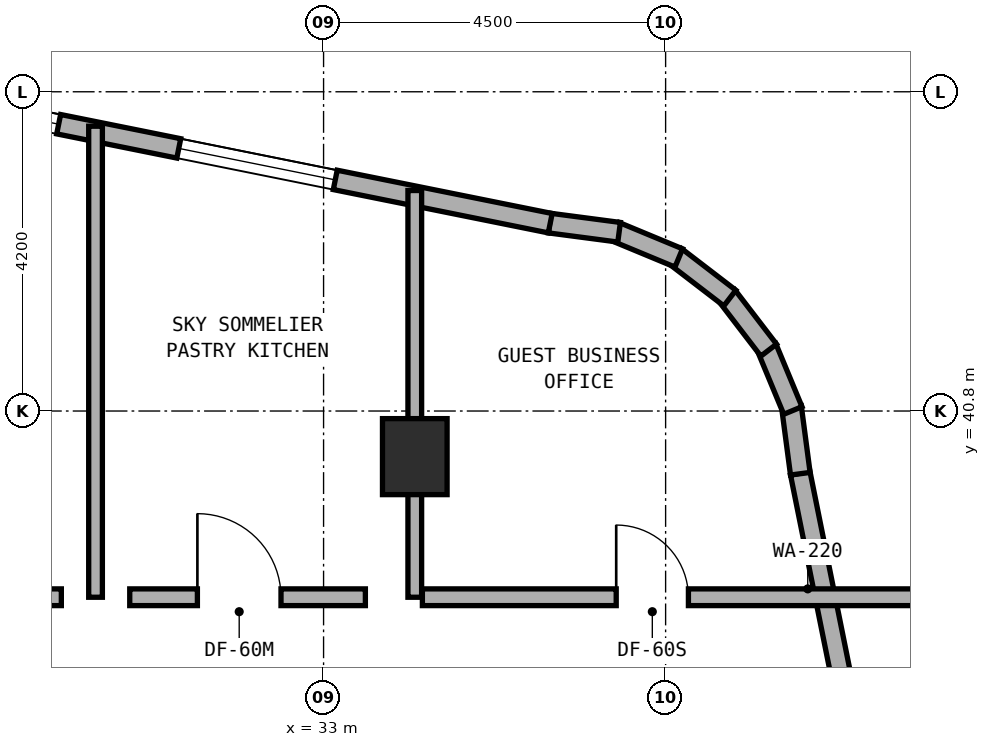
"""IFC4 building model, lengths in metres.
Left out: names, types, materials, properties, quantities, classifications, styles, units other than length and angle.
Written with IfcOpenShell. Run it as: python <this file> out.ifc"""

import sys

from ifc_helpers import new_model, si_unit, direction, frame, frame_2d, origin, origin_2d, place, context, subcontext, project, spatial, rectangle, extrude, element, fill, save


model = new_model("IFC4")
c1 = context("Model", 3, precision=1e-05, world=origin(), true_north=direction((0.0, 1.0)))
c2 = subcontext(c1, "Body", "Model", "MODEL_VIEW")
j1 = project(units=[si_unit("LENGTHUNIT", "METRE"), si_unit("PLANEANGLEUNIT", "RADIAN")], contexts=[c1])
p1 = place(None, origin())
s1 = spatial("IfcSite", under=j1, at=p1, CompositionType="ELEMENT")
p2 = place(p1, origin())
s2 = spatial("IfcBuilding", under=s1, at=p2, CompositionType="ELEMENT")
p3 = place(p2, frame((0.0, 0.0, 166.0)))
s3 = spatial("IfcBuildingStorey", under=s2, at=p3, CompositionType="ELEMENT", Elevation=166.0)
p4 = place(p3, frame((34.2, 40.2, 0.0), z_axis=(0.0, 0.0, 1.0), x_axis=(1.0, 0.0, 0.0)))
e1 = element("IfcColumn", 1, at=p4, inside=s3, PredefinedType="COLUMN", context=c2, shape_type="SweptSolid", body=[
    extrude(rectangle(XDim=0.85, YDim=1.0, at=origin_2d()), origin(), (0.0, 0.0, 1.0), 3.5),
])
p5 = place(p3, frame((41.084, 30.98, 0.0), z_axis=(0.0, 0.0, 1.0), x_axis=(-0.197435082048, 0.980315963543, 0.0)))
e2 = element("IfcWall", 2, at=p5, inside=s3, PredefinedType="STANDARD", context=c2, shape_type="SweptSolid", body=[
    extrude(rectangle(XDim=9.183, YDim=0.26, at=frame_2d((4.591, 0.0))), origin(), (0.0, 0.0, 1.0), 3.22),
])
p6 = place(p5, frame((1.734, 0.0, 0.85)))
e3 = element("IfcOpeningElement", 3, at=p6, cuts=e2, PredefinedType="OPENING", context=c2, shape_type="SweptSolid", body=[
    extrude(rectangle(XDim=2.1, YDim=1.5, at=frame_2d((1.05, 0.75))), frame((0.0, 0.14, 0.0), z_axis=(0.0, -1.0, 0.0), x_axis=(1.0, 0.0, 0.0)), (0.0, 0.0, 1.0), 0.28),
])
p7 = place(p3, frame((39.272, 39.975, 0.0), z_axis=(0.0, 0.0, 1.0), x_axis=(-0.130953706898, 0.991388484223, 0.0)))
e4 = element("IfcWall", 4, at=p7, inside=s3, PredefinedType="STANDARD", context=c2, shape_type="SweptSolid", body=[
    extrude(rectangle(XDim=0.885, YDim=0.26, at=frame_2d((0.443, 0.0))), origin(), (0.0, 0.0, 1.0), 3.22),
])
p8 = place(p3, frame((39.174, 40.807, 0.0), z_axis=(0.0, 0.0, 1.0), x_axis=(-0.383290660547, 0.923627776508, 0.0)))
e5 = element("IfcWall", 5, at=p8, inside=s3, PredefinedType="STANDARD", context=c2, shape_type="SweptSolid", body=[
    extrude(rectangle(XDim=0.903, YDim=0.26, at=frame_2d((0.452, 0.0))), origin(), (0.0, 0.0, 1.0), 3.22),
])
p9 = place(p3, frame((38.856, 41.601, 0.0), z_axis=(0.0, 0.0, 1.0), x_axis=(-0.608624690463, 0.793458244748, 0.0)))
e6 = element("IfcWall", 6, at=p9, inside=s3, PredefinedType="STANDARD", context=c2, shape_type="SweptSolid", body=[
    extrude(rectangle(XDim=0.902, YDim=0.26, at=frame_2d((0.451, 0.0))), origin(), (0.0, 0.0, 1.0), 3.22),
])
p10 = place(p3, frame((38.345, 42.286, 0.0), z_axis=(0.0, 0.0, 1.0), x_axis=(-0.793558456666, 0.608494022858, 0.0)))
e7 = element("IfcWall", 7, at=p10, inside=s3, PredefinedType="STANDARD", context=c2, shape_type="SweptSolid", body=[
    extrude(rectangle(XDim=0.902, YDim=0.26, at=frame_2d((0.451, 0.0))), origin(), (0.0, 0.0, 1.0), 3.22),
])
p11 = place(p3, frame((37.673, 42.814, 0.0), z_axis=(0.0, 0.0, 1.0), x_axis=(-0.923683767999, 0.383155708213, 0.0)))
e8 = element("IfcWall", 8, at=p11, inside=s3, PredefinedType="STANDARD", context=c2, shape_type="SweptSolid", body=[
    extrude(rectangle(XDim=0.903, YDim=0.26, at=frame_2d((0.451, 0.0))), origin(), (0.0, 0.0, 1.0), 3.22),
])
p12 = place(p3, frame((36.888, 43.152, 0.0), z_axis=(0.0, 0.0, 1.0), x_axis=(-0.991487658083, 0.130200706103, 0.0)))
e9 = element("IfcWall", 9, at=p12, inside=s3, PredefinedType="STANDARD", context=c2, shape_type="SweptSolid", body=[
    extrude(rectangle(XDim=0.921, YDim=0.26, at=frame_2d((0.46, 0.0))), origin(), (0.0, 0.0, 1.0), 3.22),
])
p13 = place(p3, frame((35.982, 43.271, 0.0), z_axis=(0.0, 0.0, 1.0), x_axis=(-0.980317172899, 0.197429077186, 0.0)))
e10 = element("IfcWall", 10, at=p13, inside=s3, PredefinedType="STANDARD", context=c2, shape_type="SweptSolid", body=[
    extrude(rectangle(XDim=9.117, YDim=0.26, at=frame_2d((4.559, 0.0))), origin(), (0.0, 0.0, 1.0), 3.22),
])
p14 = place(p13, frame((2.885, 0.0, 0.85)))
e11 = element("IfcOpeningElement", 11, at=p14, cuts=e10, PredefinedType="OPENING", context=c2, shape_type="SweptSolid", body=[
    extrude(rectangle(XDim=2.1, YDim=1.5, at=frame_2d((1.05, 0.75))), frame((0.0, 0.14, 0.0), z_axis=(0.0, -1.0, 0.0), x_axis=(1.0, 0.0, 0.0)), (0.0, 0.0, 1.0), 0.28),
])
p15 = place(p13, frame((6.597, 0.0, 0.85)))
e12 = element("IfcOpeningElement", 12, at=p15, cuts=e10, PredefinedType="OPENING", context=c2, shape_type="SweptSolid", body=[
    extrude(rectangle(XDim=2.1, YDim=1.5, at=frame_2d((1.05, 0.75))), frame((0.0, 0.14, 0.0), z_axis=(0.0, -1.0, 0.0), x_axis=(1.0, 0.0, 0.0)), (0.0, 0.0, 1.0), 0.28),
])
p16 = place(p3, frame((30.0, 38.35, 0.0), z_axis=(0.0, 0.0, 1.0), x_axis=(0.0, 1.0, 0.0)))
e13 = element("IfcWall", 13, at=p16, inside=s3, PredefinedType="SOLIDWALL", context=c2, shape_type="SweptSolid", body=[
    extrude(rectangle(XDim=6.197, YDim=0.18, at=frame_2d((3.099, 0.0))), origin(), (0.0, 0.0, 1.0), 2.835),
])
p17 = place(p3, frame((26.45, 38.35, 0.0), z_axis=(0.0, 0.0, 1.0), x_axis=(1.0, 0.0, 0.0)))
e14 = element("IfcWall", 14, at=p17, inside=s3, PredefinedType="SOLIDWALL", context=c2, shape_type="SweptSolid", body=[
    extrude(rectangle(XDim=3.1, YDim=0.22, at=frame_2d((1.55, 0.0))), origin(), (0.0, 0.0, 1.0), 2.795),
])
p18 = place(p17, frame((0.89, 0.0, 0.0)))
e15 = element("IfcOpeningElement", 15, at=p18, cuts=e14, PredefinedType="OPENING", context=c2, shape_type="SweptSolid", body=[
    extrude(rectangle(XDim=1.1, YDim=2.1, at=frame_2d((0.55, 1.05))), frame((0.0, 0.12, 0.0), z_axis=(0.0, -1.0, 0.0), x_axis=(1.0, 0.0, 0.0)), (0.0, 0.0, 1.0), 0.24),
])
p19 = place(p3, frame((30.45, 38.35, 0.0), z_axis=(0.0, 0.0, 1.0), x_axis=(1.0, 0.0, 0.0)))
e16 = element("IfcWall", 16, at=p19, inside=s3, PredefinedType="SOLIDWALL", context=c2, shape_type="SweptSolid", body=[
    extrude(rectangle(XDim=3.1, YDim=0.22, at=frame_2d((1.55, 0.0))), origin(), (0.0, 0.0, 1.0), 3.22),
])
p20 = place(p19, frame((0.89, 0.0, 0.0)))
e17 = element("IfcOpeningElement", 17, at=p20, cuts=e16, PredefinedType="OPENING", context=c2, shape_type="SweptSolid", body=[
    extrude(rectangle(XDim=1.1, YDim=2.1, at=frame_2d((0.55, 1.05))), frame((0.0, 0.12, 0.0), z_axis=(0.0, -1.0, 0.0), x_axis=(1.0, 0.0, 0.0)), (0.0, 0.0, 1.0), 0.24),
])
p21 = place(p3, frame((34.2, 38.35, 0.0), z_axis=(0.0, 0.0, 1.0), x_axis=(0.0, 1.0, 0.0)))
e18 = element("IfcWall", 18, at=p21, inside=s3, PredefinedType="SOLIDWALL", context=c2, shape_type="SweptSolid", body=[
    extrude(rectangle(XDim=5.351, YDim=0.18, at=frame_2d((2.675, 0.0))), origin(), (0.0, 0.0, 1.0), 2.795),
])
p22 = place(p3, frame((34.3, 38.35, 0.0), z_axis=(0.0, 0.0, 1.0), x_axis=(1.0, 0.0, 0.0)))
e19 = element("IfcWall", 19, at=p22, inside=s3, PredefinedType="SOLIDWALL", context=c2, shape_type="SweptSolid", body=[
    extrude(rectangle(XDim=6.64, YDim=0.22, at=frame_2d((3.32, 0.0))), origin(), (0.0, 0.0, 1.0), 2.835),
])
p23 = place(p22, frame((2.55, 0.0, 0.0)))
e20 = element("IfcOpeningElement", 20, at=p23, cuts=e19, PredefinedType="OPENING", context=c2, shape_type="SweptSolid", body=[
    extrude(rectangle(XDim=0.95, YDim=2.1, at=frame_2d((0.475, 1.05))), frame((0.0, 0.12, 0.0), z_axis=(0.0, -1.0, 0.0), x_axis=(1.0, 0.0, 0.0)), (0.0, 0.0, 1.0), 0.24),
])
p24 = place(p14, origin())
e21 = element("IfcWindow", 21, at=p24, inside=s3, PartitioningType="SINGLE_PANEL", PredefinedType="WINDOW", context=c2, shape_type="SweptSolid", body=[
    extrude(rectangle(XDim=2.1, YDim=1.5, at=frame_2d((1.05, 0.75))), frame((0.0, 0.03, 0.0), z_axis=(0.0, -1.0, 0.0), x_axis=(1.0, 0.0, 0.0)), (0.0, 0.0, 1.0), 0.06),
])
fill(e11, e21)
p25 = place(p15, origin())
e22 = element("IfcWindow", 22, at=p25, inside=s3, PartitioningType="SINGLE_PANEL", PredefinedType="WINDOW", context=c2, shape_type="SweptSolid", body=[
    extrude(rectangle(XDim=2.1, YDim=1.5, at=frame_2d((1.05, 0.75))), frame((0.0, 0.03, 0.0), z_axis=(0.0, -1.0, 0.0), x_axis=(1.0, 0.0, 0.0)), (0.0, 0.0, 1.0), 0.06),
])
fill(e12, e22)
p26 = place(p20, origin())
e23 = element("IfcDoor", 23, at=p26, inside=s3, OperationType="SINGLE_SWING_LEFT", PredefinedType="DOOR", context=c2, shape_type="SweptSolid", body=[
    extrude(rectangle(XDim=1.1, YDim=2.1, at=frame_2d((0.55, 1.05))), frame((0.0, 0.025, 0.0), z_axis=(0.0, -1.0, 0.0), x_axis=(1.0, 0.0, 0.0)), (0.0, 0.0, 1.0), 0.05),
])
fill(e17, e23)
p27 = place(p23, origin())
e24 = element("IfcDoor", 24, at=p27, inside=s3, OperationType="SINGLE_SWING_LEFT", PredefinedType="DOOR", context=c2, shape_type="SweptSolid", body=[
    extrude(rectangle(XDim=0.95, YDim=2.1, at=frame_2d((0.475, 1.05))), frame((0.0, 0.025, 0.0), z_axis=(0.0, -1.0, 0.0), x_axis=(1.0, 0.0, 0.0)), (0.0, 0.0, 1.0), 0.05),
])
fill(e20, e24)
save(model, sys.argv[1])
